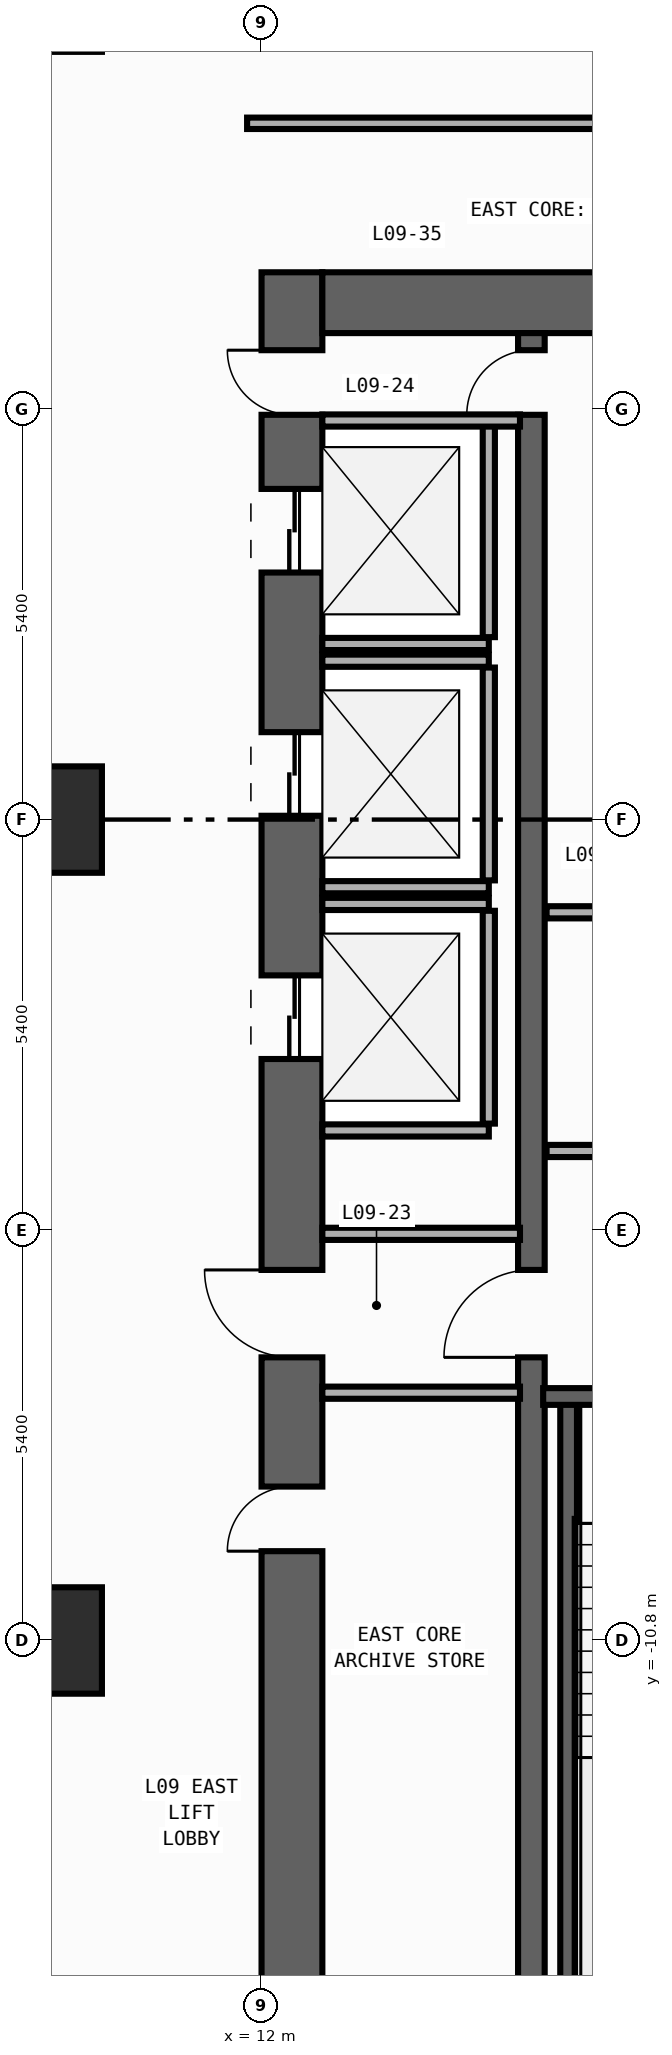
"""IFC4 building model, lengths in metres.
Left out: names, types, materials, properties, quantities, classifications, styles, units other than length and angle.
Written with IfcOpenShell. Run it as: python <this file> out.ifc"""

import sys

from ifc_helpers import new_model, si_unit, direction, frame, frame_2d, origin, origin_2d, place, context, subcontext, project, spatial, rectangle, extrude, element, fill, save


model = new_model("IFC4")
c1 = context("Model", 3, precision=1e-05, world=origin(), true_north=direction((0.0, 1.0)))
c2 = subcontext(c1, "Body", "Model", "MODEL_VIEW")
j1 = project(units=[si_unit("LENGTHUNIT", "METRE"), si_unit("PLANEANGLEUNIT", "RADIAN")], contexts=[c1])
p1 = place(None, origin())
s1 = spatial("IfcSite", under=j1, at=p1, CompositionType="ELEMENT")
p2 = place(p1, origin())
s2 = spatial("IfcBuilding", under=s1, at=p2, CompositionType="ELEMENT")
p3 = place(p2, frame((0.0, 0.0, 38.6)))
s3 = spatial("IfcBuildingStorey", under=s2, at=p3, CompositionType="ELEMENT", Elevation=38.6)
p4 = place(p3, frame((12.4, -19.8, 0.0), z_axis=(0.0, 0.0, 1.0), x_axis=(0.0, 1.0, 0.0)))
e1 = element("IfcWall", 1, at=p4, inside=s3, PredefinedType="SHEAR", context=c2, shape_type="SweptSolid", body=[
    extrude(rectangle(XDim=27.0, YDim=0.8, at=frame_2d((13.5, 0.0))), origin(), (0.0, 0.0, 1.0), 3.94),
])
p5 = place(p4, frame((23.05, 0.0, 0.0)))
e2 = element("IfcOpeningElement", 2, at=p5, cuts=e1, PredefinedType="OPENING", context=c2, shape_type="SweptSolid", body=[
    extrude(rectangle(XDim=1.1, YDim=2.2, at=frame_2d((0.55, 1.1))), frame((0.0, 0.41, 0.0), z_axis=(0.0, -1.0, 0.0), x_axis=(1.0, 0.0, 0.0)), (0.0, 0.0, 1.0), 0.82),
])
p6 = place(p4, frame((19.85, 0.0, 0.0)))
e3 = element("IfcOpeningElement", 3, at=p6, cuts=e1, PredefinedType="OPENING", context=c2, shape_type="SweptSolid", body=[
    extrude(rectangle(XDim=1.1, YDim=2.2, at=frame_2d((0.55, 1.1))), frame((0.0, 0.41, 0.0), z_axis=(0.0, -1.0, 0.0), x_axis=(1.0, 0.0, 0.0)), (0.0, 0.0, 1.0), 0.82),
])
p7 = place(p4, frame((16.65, 0.0, 0.0)))
e4 = element("IfcOpeningElement", 4, at=p7, cuts=e1, PredefinedType="OPENING", context=c2, shape_type="SweptSolid", body=[
    extrude(rectangle(XDim=1.1, YDim=2.2, at=frame_2d((0.55, 1.1))), frame((0.0, 0.41, 0.0), z_axis=(0.0, -1.0, 0.0), x_axis=(1.0, 0.0, 0.0)), (0.0, 0.0, 1.0), 0.82),
])
p8 = place(p4, frame((10.175, 0.0, 0.0)))
e5 = element("IfcOpeningElement", 5, at=p8, cuts=e1, PredefinedType="OPENING", context=c2, shape_type="SweptSolid", body=[
    extrude(rectangle(XDim=0.85, YDim=2.1, at=frame_2d((0.425, 1.05))), frame((0.0, 0.41, 0.0), z_axis=(0.0, -1.0, 0.0), x_axis=(1.0, 0.0, 0.0)), (0.0, 0.0, 1.0), 0.82),
])
p9 = place(p4, frame((12.725, 0.0, 0.0)))
e6 = element("IfcOpeningElement", 6, at=p9, cuts=e1, PredefinedType="OPENING", context=c2, shape_type="SweptSolid", body=[
    extrude(rectangle(XDim=1.15, YDim=2.2, at=frame_2d((0.575, 1.1))), frame((0.0, 0.41, 0.0), z_axis=(0.0, -1.0, 0.0), x_axis=(1.0, 0.0, 0.0)), (0.0, 0.0, 1.0), 0.82),
])
p10 = place(p4, frame((25.125, 0.0, 0.0)))
e7 = element("IfcOpeningElement", 7, at=p10, cuts=e1, PredefinedType="OPENING", context=c2, shape_type="SweptSolid", body=[
    extrude(rectangle(XDim=0.85, YDim=2.1, at=frame_2d((0.425, 1.05))), frame((0.0, 0.41, 0.0), z_axis=(0.0, -1.0, 0.0), x_axis=(1.0, 0.0, 0.0)), (0.0, 0.0, 1.0), 0.82),
])
p11 = place(p3, frame((12.8, 6.8, 0.0), z_axis=(0.0, 0.0, 1.0), x_axis=(1.0, 0.0, 0.0)))
e8 = element("IfcWall", 8, at=p11, inside=s3, PredefinedType="SHEAR", context=c2, shape_type="SweptSolid", body=[
    extrude(rectangle(XDim=6.8, YDim=0.8, at=frame_2d((3.4, 0.0))), origin(), (0.0, 0.0, 1.0), 3.94),
])
p12 = place(p3, frame((15.55, -19.0, 0.0), z_axis=(0.0, 0.0, 1.0), x_axis=(0.0, 1.0, 0.0)))
e9 = element("IfcWall", 9, at=p12, inside=s3, PredefinedType="SHEAR", context=c2, shape_type="SweptSolid", body=[
    extrude(rectangle(XDim=25.4, YDim=0.35, at=frame_2d((12.7, 0.0))), origin(), (0.0, 0.0, 1.0), 3.94),
])
p13 = place(p12, frame((11.925, 0.0, 0.0)))
e10 = element("IfcOpeningElement", 10, at=p13, cuts=e9, PredefinedType="OPENING", context=c2, shape_type="SweptSolid", body=[
    extrude(rectangle(XDim=1.15, YDim=2.2, at=frame_2d((0.575, 1.1))), frame((0.0, 0.185, 0.0), z_axis=(0.0, -1.0, 0.0), x_axis=(1.0, 0.0, 0.0)), (0.0, 0.0, 1.0), 0.37),
])
p14 = place(p12, frame((24.325, 0.0, 0.0)))
e11 = element("IfcOpeningElement", 11, at=p14, cuts=e9, PredefinedType="OPENING", context=c2, shape_type="SweptSolid", body=[
    extrude(rectangle(XDim=0.85, YDim=2.1, at=frame_2d((0.425, 1.05))), frame((0.0, 0.185, 0.0), z_axis=(0.0, -1.0, 0.0), x_axis=(1.0, 0.0, 0.0)), (0.0, 0.0, 1.0), 0.37),
])
p15 = place(p3, frame((16.04, -18.89, 0.0), z_axis=(0.0, 0.0, 1.0), x_axis=(0.0, 1.0, 0.0)))
e12 = element("IfcWall", 12, at=p15, inside=s3, PredefinedType="SHEAR", context=c2, shape_type="SweptSolid", body=[
    extrude(rectangle(XDim=11.3, YDim=0.22, at=frame_2d((5.65, 0.0))), origin(), (0.0, 0.0, 1.0), 3.94),
])
p16 = place(p3, frame((19.62, -7.59, 0.0), z_axis=(0.0, 0.0, 1.0), x_axis=(-1.0, 0.0, 0.0)))
e13 = element("IfcWall", 13, at=p16, inside=s3, PredefinedType="SHEAR", context=c2, shape_type="SweptSolid", body=[
    extrude(rectangle(XDim=3.915, YDim=0.22, at=frame_2d((1.958, 0.0))), origin(), (0.0, 0.0, 1.0), 3.94),
])
p17 = place(p16, frame((1.08, 0.0, 0.0)))
e14 = element("IfcOpeningElement", 14, at=p17, cuts=e13, PredefinedType="OPENING", context=c2, shape_type="SweptSolid", body=[
    extrude(rectangle(XDim=1.1, YDim=2.2, at=frame_2d((0.55, 1.1))), frame((0.0, 0.12, 0.0), z_axis=(0.0, -1.0, 0.0), x_axis=(1.0, 0.0, 0.0)), (0.0, 0.0, 1.0), 0.24),
])
for number, where, z_axis, x_axis in (
    (15, (9.2, -10.8, 0.0), (0.0, 0.0, 1.0), (1.0, 0.0, 0.0)),
    (16, (9.2, 0.0, 0.0), (0.0, 0.0, 1.0), (1.0, 0.0, 0.0)),
):
    element("IfcColumn", number, at=place(p3, frame(where, z_axis=z_axis, x_axis=x_axis)), inside=s3, PredefinedType="COLUMN", context=c2, shape_type="SweptSolid", body=[
        extrude(rectangle(XDim=1.4, YDim=1.4, at=origin_2d()), origin(), (0.0, 0.0, 1.0), 4.2),
    ])
p18 = place(p3, frame((12.8, 2.31, 0.0), z_axis=(0.0, 0.0, 1.0), x_axis=(1.0, 0.0, 0.0)))
e17 = element("IfcWall", 17, at=p18, inside=s3, PredefinedType="STANDARD", context=c2, shape_type="SweptSolid", body=[
    extrude(rectangle(XDim=2.19, YDim=0.16, at=frame_2d((1.095, 0.0))), origin(), (0.0, 0.0, 1.0), 3.94),
])
p19 = place(p3, frame((14.99, 2.4, 0.0), z_axis=(0.0, 0.0, 1.0), x_axis=(0.0, 1.0, 0.0)))
e18 = element("IfcWall", 18, at=p19, inside=s3, PredefinedType="STANDARD", context=c2, shape_type="SweptSolid", body=[
    extrude(rectangle(XDim=2.8, YDim=0.16, at=frame_2d((1.4, 0.0))), origin(), (0.0, 0.0, 1.0), 3.94),
])
for number, where, z_axis, x_axis in (
    (19, (12.8, -0.89, 0.0), (0.0, 0.0, 1.0), (1.0, 0.0, 0.0)),
    (20, (12.8, 2.09, 0.0), (0.0, 0.0, 1.0), (1.0, 0.0, 0.0)),
):
    element("IfcWall", number, at=place(p3, frame(where, z_axis=z_axis, x_axis=x_axis)), inside=s3, PredefinedType="STANDARD", context=c2, shape_type="SweptSolid", body=[
        extrude(rectangle(XDim=2.19, YDim=0.16, at=frame_2d((1.095, 0.0))), origin(), (0.0, 0.0, 1.0), 3.94),
    ])
p20 = place(p3, frame((14.99, -0.8, 0.0), z_axis=(0.0, 0.0, 1.0), x_axis=(0.0, 1.0, 0.0)))
e21 = element("IfcWall", 21, at=p20, inside=s3, PredefinedType="STANDARD", context=c2, shape_type="SweptSolid", body=[
    extrude(rectangle(XDim=2.8, YDim=0.16, at=frame_2d((1.4, 0.0))), origin(), (0.0, 0.0, 1.0), 3.94),
])
for number, where, z_axis, x_axis in (
    (22, (12.8, -4.09, 0.0), (0.0, 0.0, 1.0), (1.0, 0.0, 0.0)),
    (23, (12.8, -1.11, 0.0), (0.0, 0.0, 1.0), (1.0, 0.0, 0.0)),
):
    element("IfcWall", number, at=place(p3, frame(where, z_axis=z_axis, x_axis=x_axis)), inside=s3, PredefinedType="STANDARD", context=c2, shape_type="SweptSolid", body=[
        extrude(rectangle(XDim=2.19, YDim=0.16, at=frame_2d((1.095, 0.0))), origin(), (0.0, 0.0, 1.0), 3.94),
    ])
p21 = place(p3, frame((14.99, -4.0, 0.0), z_axis=(0.0, 0.0, 1.0), x_axis=(0.0, 1.0, 0.0)))
e24 = element("IfcWall", 24, at=p21, inside=s3, PredefinedType="STANDARD", context=c2, shape_type="SweptSolid", body=[
    extrude(rectangle(XDim=2.8, YDim=0.16, at=frame_2d((1.4, 0.0))), origin(), (0.0, 0.0, 1.0), 3.94),
])
p22 = place(p3, frame((15.75, -4.36, 0.0), z_axis=(0.0, 0.0, 1.0), x_axis=(1.0, 0.0, 0.0)))
e25 = element("IfcWall", 25, at=p22, inside=s3, PredefinedType="STANDARD", context=c2, shape_type="SweptSolid", body=[
    extrude(rectangle(XDim=3.8, YDim=0.16, at=frame_2d((1.9, 0.0))), origin(), (0.0, 0.0, 1.0), 3.94),
])
p23 = place(p22, frame((1.47, 0.0, 0.0)))
e26 = element("IfcOpeningElement", 26, at=p23, cuts=e25, PredefinedType="OPENING", context=c2, shape_type="SweptSolid", body=[
    extrude(rectangle(XDim=1.15, YDim=2.2, at=frame_2d((0.575, 1.1))), frame((0.0, 0.09, 0.0), z_axis=(0.0, -1.0, 0.0), x_axis=(1.0, 0.0, 0.0)), (0.0, 0.0, 1.0), 0.18),
])
p24 = place(p3, frame((15.75, -1.22, 0.0), z_axis=(0.0, 0.0, 1.0), x_axis=(1.0, 0.0, 0.0)))
e27 = element("IfcWall", 27, at=p24, inside=s3, PredefinedType="STANDARD", context=c2, shape_type="SweptSolid", body=[
    extrude(rectangle(XDim=3.8, YDim=0.16, at=frame_2d((1.9, 0.0))), origin(), (0.0, 0.0, 1.0), 3.94),
])
for number, where, z_axis, x_axis in (
    (28, (12.8, -5.45, 0.0), (0.0, 0.0, 1.0), (1.0, 0.0, 0.0)),
    (29, (12.8, -7.54, 0.0), (0.0, 0.0, 1.0), (1.0, 0.0, 0.0)),
    (30, (12.8, 5.25, 0.0), (0.0, 0.0, 1.0), (1.0, 0.0, 0.0)),
):
    element("IfcWall", number, at=place(p3, frame(where, z_axis=z_axis, x_axis=x_axis)), inside=s3, PredefinedType="STANDARD", context=c2, shape_type="SweptSolid", body=[
        extrude(rectangle(XDim=2.6, YDim=0.16, at=frame_2d((1.3, 0.0))), origin(), (0.0, 0.0, 1.0), 3.94),
    ])
p25 = place(p3, frame((11.81, 9.16, 0.0), z_axis=(0.0, 0.0, 1.0), x_axis=(1.0, 0.0, 0.0)))
e31 = element("IfcWall", 31, at=p25, inside=s3, PredefinedType="PARTITIONING", context=c2, shape_type="SweptSolid", body=[
    extrude(rectangle(XDim=8.83, YDim=0.15, at=frame_2d((4.415, 0.0))), origin(), (0.0, 0.0, 1.0), 3.94),
])
p26 = place(p25, frame((5.067, 0.0, 0.0)))
e32 = element("IfcOpeningElement", 32, at=p26, cuts=e31, PredefinedType="OPENING", context=c2, shape_type="SweptSolid", body=[
    extrude(rectangle(XDim=0.9, YDim=2.15, at=frame_2d((0.45, 1.075))), frame((0.0, 0.085, 0.0), z_axis=(0.0, -1.0, 0.0), x_axis=(1.0, 0.0, 0.0)), (0.0, 0.0, 1.0), 0.17),
])
p27 = place(p5, origin())
e33 = element("IfcDoor", 33, at=p27, inside=s3, OperationType="DOUBLE_DOOR_SLIDING", PredefinedType="DOOR", context=c2, shape_type="SweptSolid", body=[
    extrude(rectangle(XDim=1.1, YDim=2.2, at=frame_2d((0.55, 1.1))), frame((0.0, 0.025, 0.0), z_axis=(0.0, -1.0, 0.0), x_axis=(1.0, 0.0, 0.0)), (0.0, 0.0, 1.0), 0.05),
])
fill(e2, e33)
p28 = place(p6, origin())
e34 = element("IfcDoor", 34, at=p28, inside=s3, OperationType="DOUBLE_DOOR_SLIDING", PredefinedType="DOOR", context=c2, shape_type="SweptSolid", body=[
    extrude(rectangle(XDim=1.1, YDim=2.2, at=frame_2d((0.55, 1.1))), frame((0.0, 0.025, 0.0), z_axis=(0.0, -1.0, 0.0), x_axis=(1.0, 0.0, 0.0)), (0.0, 0.0, 1.0), 0.05),
])
fill(e3, e34)
p29 = place(p7, origin())
e35 = element("IfcDoor", 35, at=p29, inside=s3, OperationType="DOUBLE_DOOR_SLIDING", PredefinedType="DOOR", context=c2, shape_type="SweptSolid", body=[
    extrude(rectangle(XDim=1.1, YDim=2.2, at=frame_2d((0.55, 1.1))), frame((0.0, 0.025, 0.0), z_axis=(0.0, -1.0, 0.0), x_axis=(1.0, 0.0, 0.0)), (0.0, 0.0, 1.0), 0.05),
])
fill(e4, e35)
p30 = place(p8, origin())
e36 = element("IfcDoor", 36, at=p30, inside=s3, OperationType="SINGLE_SWING_LEFT", PredefinedType="DOOR", context=c2, shape_type="SweptSolid", body=[
    extrude(rectangle(XDim=0.85, YDim=2.1, at=frame_2d((0.425, 1.05))), frame((0.0, 0.025, 0.0), z_axis=(0.0, -1.0, 0.0), x_axis=(1.0, 0.0, 0.0)), (0.0, 0.0, 1.0), 0.05),
])
fill(e5, e36)
p31 = place(p9, origin())
e37 = element("IfcDoor", 37, at=p31, inside=s3, OperationType="SINGLE_SWING_RIGHT", PredefinedType="DOOR", context=c2, shape_type="SweptSolid", body=[
    extrude(rectangle(XDim=1.15, YDim=2.2, at=frame_2d((0.575, 1.1))), frame((0.0, 0.025, 0.0), z_axis=(0.0, -1.0, 0.0), x_axis=(1.0, 0.0, 0.0)), (0.0, 0.0, 1.0), 0.05),
])
fill(e6, e37)
p32 = place(p13, origin())
e38 = element("IfcDoor", 38, at=p32, inside=s3, OperationType="SINGLE_SWING_LEFT", PredefinedType="DOOR", context=c2, shape_type="SweptSolid", body=[
    extrude(rectangle(XDim=1.15, YDim=2.2, at=frame_2d((0.575, 1.1))), frame((0.0, 0.025, 0.0), z_axis=(0.0, -1.0, 0.0), x_axis=(1.0, 0.0, 0.0)), (0.0, 0.0, 1.0), 0.05),
])
fill(e10, e38)
p33 = place(p10, origin())
e39 = element("IfcDoor", 39, at=p33, inside=s3, OperationType="SINGLE_SWING_RIGHT", PredefinedType="DOOR", context=c2, shape_type="SweptSolid", body=[
    extrude(rectangle(XDim=0.85, YDim=2.1, at=frame_2d((0.425, 1.05))), frame((0.0, 0.025, 0.0), z_axis=(0.0, -1.0, 0.0), x_axis=(1.0, 0.0, 0.0)), (0.0, 0.0, 1.0), 0.05),
])
fill(e7, e39)
p34 = place(p14, origin())
e40 = element("IfcDoor", 40, at=p34, inside=s3, OperationType="SINGLE_SWING_LEFT", PredefinedType="DOOR", context=c2, shape_type="SweptSolid", body=[
    extrude(rectangle(XDim=0.85, YDim=2.1, at=frame_2d((0.425, 1.05))), frame((0.0, 0.025, 0.0), z_axis=(0.0, -1.0, 0.0), x_axis=(1.0, 0.0, 0.0)), (0.0, 0.0, 1.0), 0.05),
])
fill(e11, e40)
save(model, sys.argv[1])
